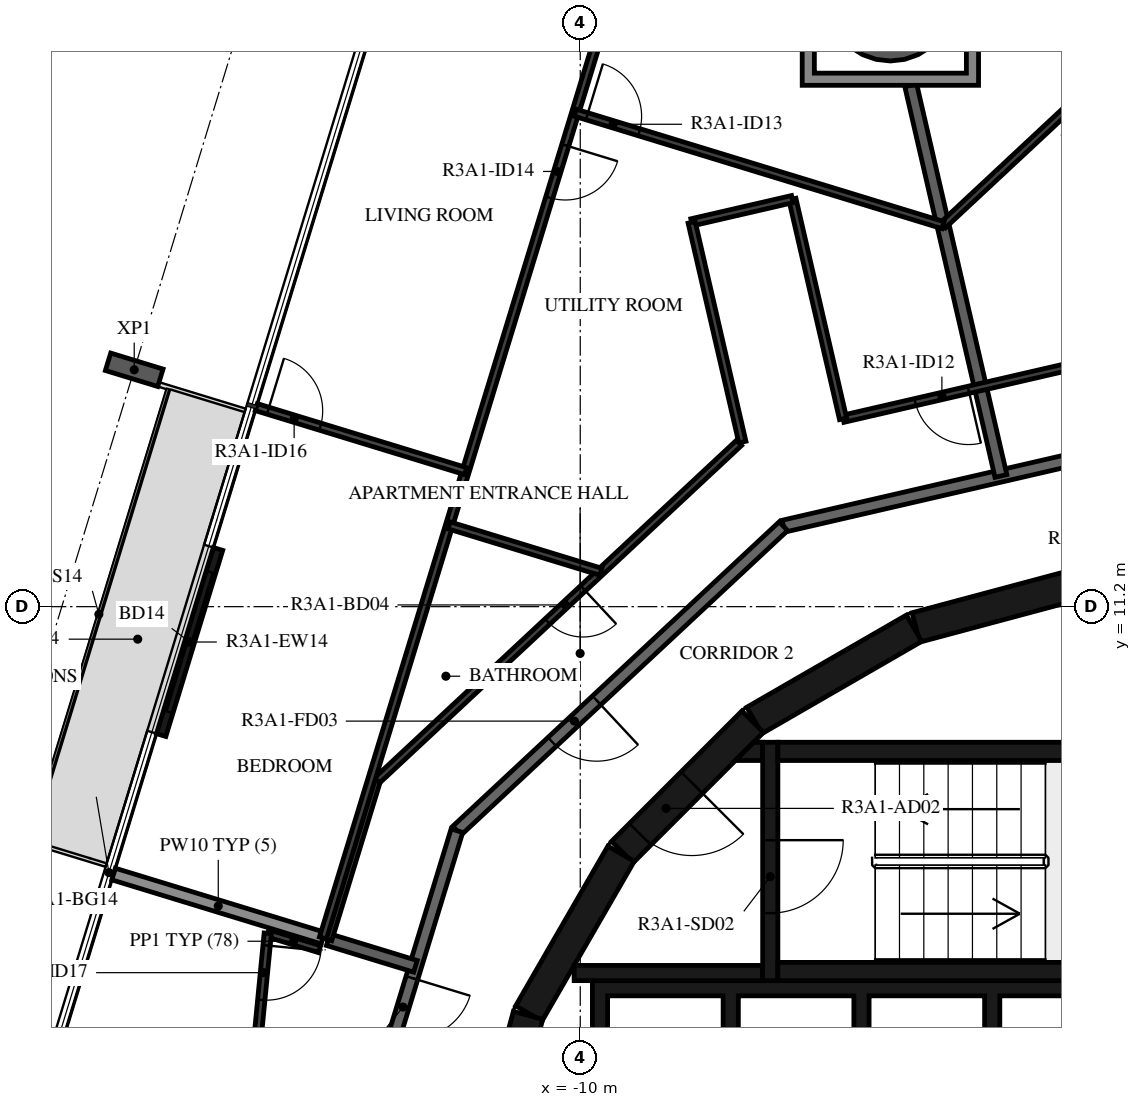
"""IFC4 building model, lengths in metres.
Left out: names, types, materials, properties, quantities, classifications, styles, units other than length and angle.
Written with IfcOpenShell. Run it as: python <this file> out.ifc"""

import sys

from ifc_helpers import new_model, si_unit, direction, frame, frame_2d, origin, origin_2d, place, context, subcontext, project, spatial, polyline, rectangle, hollow_circle, i_section, outline, extrude, element, fill, save


model = new_model("IFC4")
c1 = context("Model", 3, precision=1e-05, world=origin(), true_north=direction((0.0, 1.0)))
c2 = subcontext(c1, "Body", "Model", "MODEL_VIEW")
j1 = project(units=[si_unit("LENGTHUNIT", "METRE"), si_unit("PLANEANGLEUNIT", "RADIAN")], contexts=[c1])
p1 = place(None, origin())
s1 = spatial("IfcSite", under=j1, at=p1, CompositionType="ELEMENT")
p2 = place(p1, origin())
s2 = spatial("IfcBuilding", under=s1, at=p2, CompositionType="ELEMENT")
p3 = place(p2, frame((0.0, 0.0, 116.9)))
s3 = spatial("IfcBuildingStorey", under=s2, at=p3, CompositionType="ELEMENT", Elevation=116.9)
p4 = place(p3, frame((-4.9, 21.223, -0.38), z_axis=(0.0, 0.0, 1.0), x_axis=(1.0, 0.0, 0.0)))
e1 = element("IfcColumn", 1, at=p4, inside=s3, PredefinedType="COLUMN", context=c2, shape_type="SweptSolid", body=[
    extrude(hollow_circle(Radius=1.05, WallThickness=0.05, at=origin_2d()), origin(), (0.0, 0.0, 1.0), 3.5),
])
p5 = place(p3, frame((-17.335, 15.095, -0.38), z_axis=(0.0, 0.0, 1.0), x_axis=(0.29237190653, 0.956304694264, 0.0)))
e2 = element("IfcColumn", 2, at=p5, inside=s3, PredefinedType="COLUMN", context=c2, shape_type="SweptSolid", body=[
    extrude(i_section(OverallWidth=0.3, OverallDepth=0.9, WebThickness=0.019, FlangeThickness=0.035, FilletRadius=0.03, at=origin_2d()), origin(), (0.0, 0.0, 1.0), 3.5),
])
p6 = place(p3, frame((-15.956, 12.149, 0.0), z_axis=(0.0, 0.0, 1.0), x_axis=(-0.29243949851, -0.956284026695, 0.0)))
e3 = element("IfcWall", 3, at=p6, inside=s3, PredefinedType="STANDARD", context=c2, shape_type="SweptSolid", body=[
    extrude(rectangle(XDim=3.2, YDim=0.16, at=frame_2d((1.6, 0.0))), origin(), (0.0, 0.0, 1.0), 3.12),
])
p7 = place(p6, frame((0.4, 0.0, 0.0)))
e4 = element("IfcOpeningElement", 4, at=p7, cuts=e3, PredefinedType="OPENING", context=c2, shape_type="SweptSolid", body=[
    extrude(rectangle(XDim=2.4, YDim=2.4, at=frame_2d((1.2, 1.2))), frame((0.0, 0.09, 0.0), z_axis=(0.0, -1.0, 0.0), x_axis=(1.0, 0.0, 0.0)), (0.0, 0.0, 1.0), 0.18),
])
for number, where, z_axis, x_axis in (
    (5, (-1.55, 11.643, 0.0), (0.0, 0.0, 1.0), (-0.966, -0.259, 0.0)),
    (6, (-4.51, 10.845, 0.0), (0.0, 0.0, 1.0), (-0.866, -0.5, 0.0)),
):
    element("IfcWall", number, at=place(p3, frame(where, z_axis=z_axis, x_axis=x_axis)), inside=s3, PredefinedType="SHEAR", context=c2, shape_type="SweptSolid", body=[
        extrude(rectangle(XDim=3.033, YDim=0.5, at=frame_2d((1.516, 0.0))), origin(), (0.0, 0.0, 1.0), 3.12),
    ])
p8 = place(p3, frame((-7.164, 9.308, 0.0), z_axis=(0.0, 0.0, 1.0), x_axis=(-0.707106781187, -0.707106781187, 0.0)))
e7 = element("IfcWall", 7, at=p8, inside=s3, PredefinedType="SHEAR", context=c2, shape_type="SweptSolid", body=[
    extrude(rectangle(XDim=3.032, YDim=0.5, at=frame_2d((1.516, 0.0))), origin(), (0.0, 0.0, 1.0), 3.12),
])
p9 = place(p8, frame((1.416, 0.0, 0.0)))
e8 = element("IfcOpeningElement", 8, at=p9, cuts=e7, PredefinedType="OPENING", context=c2, shape_type="SweptSolid", body=[
    extrude(rectangle(XDim=1.2, YDim=2.1, at=frame_2d((0.6, 1.05))), frame((0.0, 0.26, 0.0), z_axis=(0.0, -1.0, 0.0), x_axis=(1.0, 0.0, 0.0)), (0.0, 0.0, 1.0), 0.52),
])
for number, where, z_axis, x_axis in (
    (9, (-9.329, 7.137, 0.0), (0.0, 0.0, 1.0), (-0.5, -0.866, 0.0)),
    (10, (-10.858, 4.479, 0.0), (0.0, 0.0, 1.0), (-0.259, -0.966, 0.0)),
):
    element("IfcWall", number, at=place(p3, frame(where, z_axis=z_axis, x_axis=x_axis)), inside=s3, PredefinedType="SHEAR", context=c2, shape_type="SweptSolid", body=[
        extrude(rectangle(XDim=3.033, YDim=0.5, at=frame_2d((1.516, 0.0))), origin(), (0.0, 0.0, 1.0), 3.12),
    ])
for number, where, z_axis, x_axis in (
    (11, (-6.75, 5.2, 0.0), (0.0, 0.0, 1.0), (1.0, 0.0, 0.0)),
    (12, (-6.75, 8.82, 0.0), (0.0, 0.0, 1.0), (1.0, 0.0, 0.0)),
):
    element("IfcWall", number, at=place(p3, frame(where, z_axis=z_axis, x_axis=x_axis)), inside=s3, PredefinedType="SHEAR", context=c2, shape_type="SweptSolid", body=[
        extrude(rectangle(XDim=6.75, YDim=0.3, at=frame_2d((3.375, 0.0))), origin(), (0.0, 0.0, 1.0), 3.12),
    ])
p10 = place(p3, frame((-6.875, 8.97, 0.0), z_axis=(0.0, 0.0, 1.0), x_axis=(0.0, -1.0, 0.0)))
e13 = element("IfcWall", 13, at=p10, inside=s3, PredefinedType="SHEAR", context=c2, shape_type="SweptSolid", body=[
    extrude(rectangle(XDim=3.92, YDim=0.25, at=frame_2d((1.96, 0.0))), origin(), (0.0, 0.0, 1.0), 3.12),
])
p11 = place(p10, frame((1.61, 0.0, 0.0)))
e14 = element("IfcOpeningElement", 14, at=p11, cuts=e13, PredefinedType="OPENING", context=c2, shape_type="SweptSolid", body=[
    extrude(rectangle(XDim=1.2, YDim=2.1, at=frame_2d((0.6, 1.05))), frame((0.0, 0.135, 0.0), z_axis=(0.0, -1.0, 0.0), x_axis=(1.0, 0.0, 0.0)), (0.0, 0.0, 1.0), 0.27),
])
p12 = place(p3, frame((-7.0, 5.175, 0.0), z_axis=(0.0, 0.0, 1.0), x_axis=(-1.0, 0.0, 0.0)))
e15 = element("IfcWall", 15, at=p12, inside=s3, PredefinedType="SHEAR", context=c2, shape_type="SweptSolid", body=[
    extrude(rectangle(XDim=3.1, YDim=0.25, at=frame_2d((1.55, 0.0))), origin(), (0.0, 0.0, 1.0), 3.12),
])
p13 = place(p3, origin())
e16 = element("IfcWall", 16, at=p13, inside=s3, PredefinedType="SHEAR", context=c2, shape_type="SweptSolid", body=[
    extrude(outline(polyline([(-7.148, 8.97), (-7.0, 8.97), (-7.0, 8.67), (-7.448, 8.67), (-7.148, 8.97)])), origin(), (0.0, 0.0, 1.0), 3.12),
])
p14 = place(p3, origin())
e17 = element("IfcWall", 17, at=p14, inside=s3, PredefinedType="SHEAR", context=c2, shape_type="SweptSolid", body=[
    extrude(outline(polyline([(-9.55, 4.8), (-7.65, 4.8), (-7.65, 1.9), (-7.4, 1.9), (-7.4, 4.8), (-5.5, 4.8), (-5.5, 1.9), (-5.25, 1.9), (-5.25, 4.8), (-3.35, 4.8), (-3.35, 1.9), (-3.1, 1.9), (-3.1, 4.8), (-1.2, 4.8), (-1.2, 1.9), (-0.95, 1.9), (-0.95, 4.8), (0.95, 4.8), (0.95, 1.9), (1.2, 1.9), (1.2, 4.8), (3.1, 4.8), (3.1, 1.9), (3.35, 1.9), (3.35, 4.8), (5.25, 4.8), (5.25, 1.9), (5.5, 1.9), (5.5, 4.8), (7.4, 4.8), (7.4, 1.9), (7.65, 1.9), (7.65, 4.8), (9.55, 4.8), (9.55, 1.9), (9.8, 1.9), (9.8, 4.8), (9.8, 5.05), (-9.8, 5.05), (-9.8, 4.8), (-9.8, 1.9), (-9.55, 1.9), (-9.55, 4.8)])), origin(), (0.0, 0.0, 1.0), 3.12),
])
p15 = place(p3, frame((0.495, 14.175, 0.0), z_axis=(0.0, 0.0, 1.0), x_axis=(-0.974376622151, -0.224922649383, 0.0)))
e18 = element("IfcWall", 18, at=p15, inside=s3, PredefinedType="STANDARD", context=c2, shape_type="SweptSolid", body=[
    extrude(rectangle(XDim=7.342, YDim=0.2, at=frame_2d((3.671, 0.0))), origin(), (0.0, 0.0, 1.0), 3.12),
])
p16 = place(p3, frame((-6.659, 12.523, 0.0), z_axis=(0.0, 0.0, 1.0), x_axis=(-0.731350455479, -0.682001841105, 0.0)))
e19 = element("IfcWall", 19, at=p16, inside=s3, PredefinedType="STANDARD", context=c2, shape_type="SweptSolid", body=[
    extrude(rectangle(XDim=7.342, YDim=0.2, at=frame_2d((3.671, 0.0))), origin(), (0.0, 0.0, 1.0), 3.12),
])
p17 = place(p16, frame((4.2, 0.0, 0.0)))
e20 = element("IfcOpeningElement", 20, at=p17, cuts=e19, PredefinedType="OPENING", context=c2, shape_type="SweptSolid", body=[
    extrude(rectangle(XDim=1.0, YDim=2.1, at=frame_2d((0.5, 1.05))), frame((0.0, 0.11, 0.0), z_axis=(0.0, -1.0, 0.0), x_axis=(1.0, 0.0, 0.0)), (0.0, 0.0, 1.0), 0.22),
])
p18 = place(p3, frame((-12.028, 7.516, 0.0), z_axis=(0.0, 0.0, 1.0), x_axis=(-0.292365533182, -0.956306642771, 0.0)))
e21 = element("IfcWall", 21, at=p18, inside=s3, PredefinedType="STANDARD", context=c2, shape_type="SweptSolid", body=[
    extrude(rectangle(XDim=7.342, YDim=0.2, at=frame_2d((3.671, 0.0))), origin(), (0.0, 0.0, 1.0), 3.12),
])
p19 = place(p18, frame((2.533, 0.0, 0.0)))
e22 = element("IfcOpeningElement", 22, at=p19, cuts=e21, PredefinedType="OPENING", context=c2, shape_type="SweptSolid", body=[
    extrude(rectangle(XDim=1.0, YDim=2.1, at=frame_2d((0.5, 1.05))), frame((0.0, 0.11, 0.0), z_axis=(0.0, -1.0, 0.0), x_axis=(1.0, 0.0, 0.0)), (0.0, 0.0, 1.0), 0.22),
])
p20 = place(p3, frame((-4.565, 19.773, 0.0), z_axis=(0.0, 0.0, 1.0), x_axis=(0.224940633072, -0.974372470667, 0.0)))
e23 = element("IfcWall", 23, at=p20, inside=s3, PredefinedType="STANDARD", context=c2, shape_type="SweptSolid", body=[
    extrude(rectangle(XDim=6.594, YDim=0.2, at=frame_2d((3.297, 0.0))), origin(), (0.0, 0.0, 1.0), 3.12),
])
p21 = place(p3, frame((-14.145, 5.724, 0.0), z_axis=(0.0, 0.0, 1.0), x_axis=(0.956266872747, -0.292495586439, 0.0)))
e24 = element("IfcWall", 24, at=p21, inside=s3, PredefinedType="STANDARD", context=c2, shape_type="SweptSolid", body=[
    extrude(rectangle(XDim=1.5, YDim=0.2, at=frame_2d((0.75, 0.0))), origin(), (0.0, 0.0, 1.0), 3.12),
])
p22 = place(p3, frame((-17.674, 6.803, 0.0), z_axis=(0.0, 0.0, 1.0), x_axis=(0.956293645939, -0.292408041504, 0.0)))
e25 = element("IfcWall", 25, at=p22, inside=s3, PredefinedType="STANDARD", context=c2, shape_type="SweptSolid", body=[
    extrude(rectangle(XDim=3.6, YDim=0.2, at=frame_2d((1.8, 0.0))), origin(), (0.0, 0.0, 1.0), 2.73),
])
p23 = place(p3, frame((-1.161, 15.332, 0.0), z_axis=(0.0, 0.0, 1.0), x_axis=(-0.974373440078, -0.224936433845, 0.0)))
e26 = element("IfcWall", 26, at=p23, inside=s3, PredefinedType="PARTITIONING", context=c2, shape_type="SweptSolid", body=[
    extrude(rectangle(XDim=4.636, YDim=0.12, at=frame_2d((2.318, 0.0))), origin(), (0.0, 0.0, 1.0), 3.12),
])
p24 = place(p23, frame((2.518, 0.0, 0.0)))
e27 = element("IfcOpeningElement", 27, at=p24, cuts=e26, PredefinedType="OPENING", context=c2, shape_type="SweptSolid", body=[
    extrude(rectangle(XDim=0.9, YDim=2.1, at=frame_2d((0.45, 1.05))), frame((0.0, 0.07, 0.0), z_axis=(0.0, -1.0, 0.0), x_axis=(1.0, 0.0, 0.0)), (0.0, 0.0, 1.0), 0.14),
])
p25 = place(p3, frame((0.591, 21.787, 0.0), z_axis=(0.0, 0.0, 1.0), x_axis=(-0.731363296574, -0.681988070588, 0.0)))
e28 = element("IfcWall", 28, at=p25, inside=s3, PredefinedType="PARTITIONING", context=c2, shape_type="SweptSolid", body=[
    extrude(rectangle(XDim=6.324, YDim=0.12, at=frame_2d((3.162, 0.0))), origin(), (0.0, 0.0, 1.0), 3.12),
])
p26 = place(p25, frame((0.6, 0.0, 0.0)))
e29 = element("IfcOpeningElement", 29, at=p26, cuts=e28, PredefinedType="OPENING", context=c2, shape_type="SweptSolid", body=[
    extrude(rectangle(XDim=0.9, YDim=2.1, at=frame_2d((0.45, 1.05))), frame((0.0, 0.07, 0.0), z_axis=(0.0, -1.0, 0.0), x_axis=(1.0, 0.0, 0.0)), (0.0, 0.0, 1.0), 0.14),
])
p27 = place(p3, frame((-5.677, 14.289, 0.0), z_axis=(0.0, 0.0, 1.0), x_axis=(-0.224960478174, 0.974367889075, 0.0)))
e30 = element("IfcWall", 30, at=p27, inside=s3, PredefinedType="PARTITIONING", context=c2, shape_type="SweptSolid", body=[
    extrude(rectangle(XDim=3.708, YDim=0.12, at=frame_2d((1.854, 0.0))), origin(), (0.0, 0.0, 1.0), 3.12),
])
p28 = place(p3, frame((-6.512, 17.902, 0.0), z_axis=(0.0, 0.0, 1.0), x_axis=(-0.974376669418, -0.224922444621, 0.0)))
e31 = element("IfcWall", 31, at=p28, inside=s3, PredefinedType="PARTITIONING", context=c2, shape_type="SweptSolid", body=[
    extrude(rectangle(XDim=1.7, YDim=0.12, at=frame_2d((0.85, 0.0))), origin(), (0.0, 0.0, 1.0), 3.12),
])
p29 = place(p3, frame((-8.168, 17.52, 0.0), z_axis=(0.0, 0.0, 1.0), x_axis=(0.224960478174, -0.974367889075, 0.0)))
e32 = element("IfcWall", 32, at=p29, inside=s3, PredefinedType="PARTITIONING", context=c2, shape_type="SweptSolid", body=[
    extrude(rectangle(XDim=3.708, YDim=0.12, at=frame_2d((1.854, 0.0))), origin(), (0.0, 0.0, 1.0), 3.12),
])
p30 = place(p3, frame((-7.388, 13.894, 0.0), z_axis=(0.0, 0.0, 1.0), x_axis=(-0.731357186721, -0.681994622729, 0.0)))
e33 = element("IfcWall", 33, at=p30, inside=s3, PredefinedType="PARTITIONING", context=c2, shape_type="SweptSolid", body=[
    extrude(rectangle(XDim=8.146, YDim=0.12, at=frame_2d((4.073, 0.0))), origin(), (0.0, 0.0, 1.0), 3.12),
])
p31 = place(p30, frame((3.509, 0.0, 0.0)))
e34 = element("IfcOpeningElement", 34, at=p31, cuts=e33, PredefinedType="OPENING", context=c2, shape_type="SweptSolid", body=[
    extrude(rectangle(XDim=0.8, YDim=2.1, at=frame_2d((0.4, 1.05))), frame((0.0, 0.07, 0.0), z_axis=(0.0, -1.0, 0.0), x_axis=(1.0, 0.0, 0.0)), (0.0, 0.0, 1.0), 0.14),
])
p32 = place(p3, frame((-13.345, 8.339, 0.0), z_axis=(0.0, 0.0, 1.0), x_axis=(-0.292316072367, -0.956321762712, 0.0)))
e35 = element("IfcWall", 35, at=p32, inside=s3, PredefinedType="PARTITIONING", context=c2, shape_type="SweptSolid", body=[
    extrude(rectangle(XDim=2.734, YDim=0.12, at=frame_2d((1.367, 0.0))), origin(), (0.0, 0.0, 1.0), 3.12),
])
p33 = place(p3, frame((-9.169, 22.31, 0.0), z_axis=(0.0, 0.0, 1.0), x_axis=(-0.29236145486, -0.956307889601, 0.0)))
e36 = element("IfcWall", 36, at=p33, inside=s3, PredefinedType="PARTITIONING", context=c2, shape_type="SweptSolid", body=[
    extrude(rectangle(XDim=17.316, YDim=0.12, at=frame_2d((8.658, 0.0))), origin(), (0.0, 0.0, 1.0), 3.12),
])
p34 = place(p33, frame((3.683, 0.0, 0.0)))
e37 = element("IfcOpeningElement", 37, at=p34, cuts=e36, PredefinedType="OPENING", context=c2, shape_type="SweptSolid", body=[
    extrude(rectangle(XDim=0.9, YDim=2.1, at=frame_2d((0.45, 1.05))), frame((0.0, 0.07, 0.0), z_axis=(0.0, -1.0, 0.0), x_axis=(1.0, 0.0, 0.0)), (0.0, 0.0, 1.0), 0.14),
])
p35 = place(p3, frame((-10.082, 19.323, 0.0), z_axis=(0.0, 0.0, 1.0), x_axis=(0.956300011431, -0.292387222936, 0.0)))
e38 = element("IfcWall", 38, at=p35, inside=s3, PredefinedType="PARTITIONING", context=c2, shape_type="SweptSolid", body=[
    extrude(rectangle(XDim=6.324, YDim=0.12, at=frame_2d((3.162, 0.0))), origin(), (0.0, 0.0, 1.0), 3.12),
])
p36 = place(p35, frame((0.2, 0.0, 0.0)))
e39 = element("IfcOpeningElement", 39, at=p36, cuts=e38, PredefinedType="OPENING", context=c2, shape_type="SweptSolid", body=[
    extrude(rectangle(XDim=0.9, YDim=2.1, at=frame_2d((0.45, 1.05))), frame((0.0, 0.07, 0.0), z_axis=(0.0, -1.0, 0.0), x_axis=(1.0, 0.0, 0.0)), (0.0, 0.0, 1.0), 0.14),
])
p37 = place(p3, frame((-12.157, 12.537, 0.0), z_axis=(0.0, 0.0, 1.0), x_axis=(0.956293441844, -0.292408708979, 0.0)))
e40 = element("IfcWall", 40, at=p37, inside=s3, PredefinedType="PARTITIONING", context=c2, shape_type="SweptSolid", body=[
    extrude(rectangle(XDim=2.609, YDim=0.12, at=frame_2d((1.305, 0.0))), origin(), (0.0, 0.0, 1.0), 3.12),
])
p38 = place(p3, frame((-15.327, 14.481, 0.0), z_axis=(0.0, 0.0, 1.0), x_axis=(0.956306810244, -0.292364985388, 0.0)))
e41 = element("IfcWall", 41, at=p38, inside=s3, PredefinedType="PARTITIONING", context=c2, shape_type="SweptSolid", body=[
    extrude(rectangle(XDim=3.6, YDim=0.12, at=frame_2d((1.8, 0.0))), origin(), (0.0, 0.0, 1.0), 2.73),
])
p39 = place(p38, frame((0.2, 0.0, 0.0)))
e42 = element("IfcOpeningElement", 42, at=p39, cuts=e41, PredefinedType="OPENING", context=c2, shape_type="SweptSolid", body=[
    extrude(rectangle(XDim=0.9, YDim=2.1, at=frame_2d((0.45, 1.05))), frame((0.0, 0.07, 0.0), z_axis=(0.0, -1.0, 0.0), x_axis=(1.0, 0.0, 0.0)), (0.0, 0.0, 1.0), 0.14),
])
p40 = place(p3, frame((-14.287, 5.568, 0.0), z_axis=(0.0, 0.0, 1.0), x_axis=(-0.956287662261, 0.292427609859, 0.0)))
e43 = element("IfcWall", 43, at=p40, inside=s3, PredefinedType="PARTITIONING", context=c2, shape_type="SweptSolid", body=[
    extrude(rectangle(XDim=0.89, YDim=0.12, at=frame_2d((0.445, 0.0))), origin(), (0.0, 0.0, 1.0), 3.12),
])
p41 = place(p3, frame((-15.138, 5.828, 0.0), z_axis=(0.0, 0.0, 1.0), x_axis=(-0.096967255409, -0.995287572201, 0.0)))
e44 = element("IfcWall", 44, at=p41, inside=s3, PredefinedType="PARTITIONING", context=c2, shape_type="SweptSolid", body=[
    extrude(rectangle(XDim=4.489, YDim=0.12, at=frame_2d((2.245, 0.0))), origin(), (0.0, 0.0, 1.0), 3.12),
])
p42 = place(p41, frame((0.2, 0.0, 0.0)))
e45 = element("IfcOpeningElement", 45, at=p42, cuts=e44, PredefinedType="OPENING", context=c2, shape_type="SweptSolid", body=[
    extrude(rectangle(XDim=0.9, YDim=2.1, at=frame_2d((0.45, 1.05))), frame((0.0, 0.07, 0.0), z_axis=(0.0, -1.0, 0.0), x_axis=(1.0, 0.0, 0.0)), (0.0, 0.0, 1.0), 0.14),
])
p43 = place(p3, origin())
e46 = element("IfcWall", 46, at=p43, inside=s3, PredefinedType="STANDARD", context=c2, shape_type="SweptSolid", body=[
    extrude(outline(polyline([(-3.45, 22.674), (-3.45, 19.773), (-6.35, 19.773), (-6.35, 22.674), (-3.45, 22.674)]), holes=[polyline([(-6.15, 19.973), (-3.65, 19.973), (-3.65, 22.473), (-6.15, 22.473), (-6.15, 19.973)])]), origin(), (0.0, 0.0, 1.0), 3.12),
])
p44 = place(p7, origin())
e47 = element("IfcDoor", 47, at=p44, inside=s3, OperationType="DOUBLE_DOOR_SLIDING", PredefinedType="DOOR", context=c2, shape_type="SweptSolid", body=[
    extrude(rectangle(XDim=2.4, YDim=2.4, at=frame_2d((1.2, 1.2))), frame((0.0, 0.025, 0.0), z_axis=(0.0, -1.0, 0.0), x_axis=(1.0, 0.0, 0.0)), (0.0, 0.0, 1.0), 0.05),
])
fill(e4, e47)
p45 = place(p11, origin())
e48 = element("IfcDoor", 48, at=p45, inside=s3, OperationType="SINGLE_SWING_LEFT", PredefinedType="DOOR", context=c2, shape_type="SweptSolid", body=[
    extrude(rectangle(XDim=1.2, YDim=2.1, at=frame_2d((0.6, 1.05))), frame((0.0, 0.025, 0.0), z_axis=(0.0, -1.0, 0.0), x_axis=(1.0, 0.0, 0.0)), (0.0, 0.0, 1.0), 0.05),
])
fill(e14, e48)
p46 = place(p9, origin())
e49 = element("IfcDoor", 49, at=p46, inside=s3, OperationType="SINGLE_SWING_RIGHT", PredefinedType="DOOR", context=c2, shape_type="SweptSolid", body=[
    extrude(rectangle(XDim=1.2, YDim=2.1, at=frame_2d((0.6, 1.05))), frame((0.0, 0.025, 0.0), z_axis=(0.0, -1.0, 0.0), x_axis=(1.0, 0.0, 0.0)), (0.0, 0.0, 1.0), 0.05),
])
fill(e8, e49)
p47 = place(p17, origin())
e50 = element("IfcDoor", 50, at=p47, inside=s3, OperationType="SINGLE_SWING_LEFT", PredefinedType="DOOR", context=c2, shape_type="SweptSolid", body=[
    extrude(rectangle(XDim=1.0, YDim=2.1, at=frame_2d((0.5, 1.05))), frame((0.0, 0.025, 0.0), z_axis=(0.0, -1.0, 0.0), x_axis=(1.0, 0.0, 0.0)), (0.0, 0.0, 1.0), 0.05),
])
fill(e20, e50)
p48 = place(p24, origin())
e51 = element("IfcDoor", 51, at=p48, inside=s3, OperationType="SINGLE_SWING_LEFT", PredefinedType="DOOR", context=c2, shape_type="SweptSolid", body=[
    extrude(rectangle(XDim=0.9, YDim=2.1, at=frame_2d((0.45, 1.05))), frame((0.0, 0.025, 0.0), z_axis=(0.0, -1.0, 0.0), x_axis=(1.0, 0.0, 0.0)), (0.0, 0.0, 1.0), 0.05),
])
fill(e27, e51)
p49 = place(p31, origin())
e52 = element("IfcDoor", 52, at=p49, inside=s3, OperationType="SINGLE_SWING_LEFT", PredefinedType="DOOR", context=c2, shape_type="SweptSolid", body=[
    extrude(rectangle(XDim=0.8, YDim=2.1, at=frame_2d((0.4, 1.05))), frame((0.0, 0.025, 0.0), z_axis=(0.0, -1.0, 0.0), x_axis=(1.0, 0.0, 0.0)), (0.0, 0.0, 1.0), 0.05),
])
fill(e34, e52)
p50 = place(p36, origin())
e53 = element("IfcDoor", 53, at=p50, inside=s3, OperationType="SINGLE_SWING_LEFT", PredefinedType="DOOR", context=c2, shape_type="SweptSolid", body=[
    extrude(rectangle(XDim=0.9, YDim=2.1, at=frame_2d((0.45, 1.05))), frame((0.0, 0.025, 0.0), z_axis=(0.0, -1.0, 0.0), x_axis=(1.0, 0.0, 0.0)), (0.0, 0.0, 1.0), 0.05),
])
fill(e39, e53)
p51 = place(p34, origin())
e54 = element("IfcDoor", 54, at=p51, inside=s3, OperationType="SINGLE_SWING_LEFT", PredefinedType="DOOR", context=c2, shape_type="SweptSolid", body=[
    extrude(rectangle(XDim=0.9, YDim=2.1, at=frame_2d((0.45, 1.05))), frame((0.0, 0.025, 0.0), z_axis=(0.0, -1.0, 0.0), x_axis=(1.0, 0.0, 0.0)), (0.0, 0.0, 1.0), 0.05),
])
fill(e37, e54)
p52 = place(p39, origin())
e55 = element("IfcDoor", 55, at=p52, inside=s3, OperationType="SINGLE_SWING_RIGHT", PredefinedType="DOOR", context=c2, shape_type="SweptSolid", body=[
    extrude(rectangle(XDim=0.9, YDim=2.1, at=frame_2d((0.45, 1.05))), frame((0.0, 0.025, 0.0), z_axis=(0.0, -1.0, 0.0), x_axis=(1.0, 0.0, 0.0)), (0.0, 0.0, 1.0), 0.05),
])
fill(e42, e55)
p53 = place(p19, origin())
e56 = element("IfcDoor", 56, at=p53, inside=s3, OperationType="SINGLE_SWING_LEFT", PredefinedType="DOOR", context=c2, shape_type="SweptSolid", body=[
    extrude(rectangle(XDim=1.0, YDim=2.1, at=frame_2d((0.5, 1.05))), frame((0.0, 0.025, 0.0), z_axis=(0.0, -1.0, 0.0), x_axis=(1.0, 0.0, 0.0)), (0.0, 0.0, 1.0), 0.05),
])
fill(e22, e56)
p54 = place(p42, origin())
e57 = element("IfcDoor", 57, at=p54, inside=s3, OperationType="SINGLE_SWING_LEFT", PredefinedType="DOOR", context=c2, shape_type="SweptSolid", body=[
    extrude(rectangle(XDim=0.9, YDim=2.1, at=frame_2d((0.45, 1.05))), frame((0.0, 0.025, 0.0), z_axis=(0.0, -1.0, 0.0), x_axis=(1.0, 0.0, 0.0)), (0.0, 0.0, 1.0), 0.05),
])
fill(e45, e57)
save(model, sys.argv[1])
